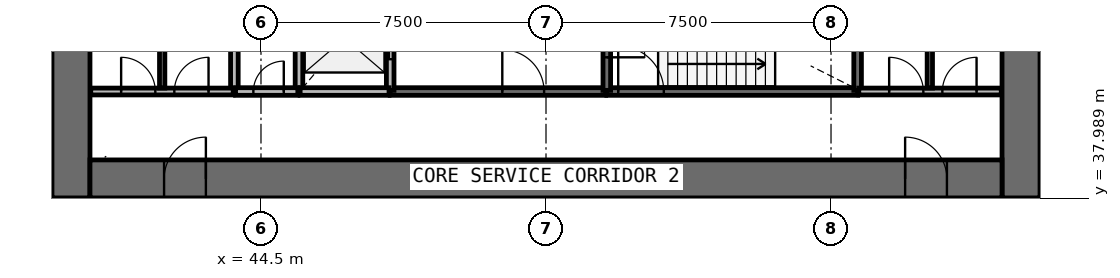
"""IFC4 building model, lengths in metres.
Left out: names, types, materials, properties, quantities, classifications, styles, units other than length and angle.
Written with IfcOpenShell. Run it as: python <this file> out.ifc"""

import sys

from ifc_helpers import new_model, si_unit, direction, frame, frame_2d, origin, place, context, subcontext, project, spatial, rectangle, extrude, source, transform, mapped, element, fill, save


model = new_model("IFC4")
c1 = context("Model", 3, precision=1e-05, world=origin(), true_north=direction((0.0, 1.0)))
c2 = subcontext(c1, "Body", "Model", "MODEL_VIEW")
j1 = project(units=[si_unit("LENGTHUNIT", "METRE"), si_unit("PLANEANGLEUNIT", "RADIAN")], contexts=[c1])
p1 = place(None, origin())
s1 = spatial("IfcSite", under=j1, at=p1, CompositionType="ELEMENT")
p2 = place(p1, origin())
s2 = spatial("IfcBuilding", under=s1, at=p2, CompositionType="ELEMENT")
p3 = place(p2, frame((0.0, 0.0, 40.2)))
s3 = spatial("IfcBuildingStorey", under=s2, at=p3, CompositionType="ELEMENT", Elevation=40.2)
p4 = place(p3, frame((64.5, 38.0, 0.0), z_axis=(0.0, 0.0, 1.0), x_axis=(0.0, 1.0, 0.0)))
e1 = element("IfcWall", 1, at=p4, inside=s3, PredefinedType="SHEAR", context=c2, shape_type="SweptSolid", body=[
    extrude(rectangle(XDim=20.0, YDim=1.0, at=frame_2d((10.0, 0.0))), origin(), (0.0, 0.0, 1.0), 4.4),
])
p5 = place(p4, frame((9.1, 0.0, 0.0)))
e2 = element("IfcOpeningElement", 2, at=p5, cuts=e1, PredefinedType="OPENING", context=c2, shape_type="SweptSolid", body=[
    extrude(rectangle(XDim=1.8, YDim=2.1, at=frame_2d((0.9, 1.05))), frame((0.0, 0.51, 0.0), z_axis=(0.0, -1.0, 0.0), x_axis=(1.0, 0.0, 0.0)), (0.0, 0.0, 1.0), 1.02),
])
p6 = place(p3, frame((39.5, 58.0, 0.0), z_axis=(0.0, 0.0, 1.0), x_axis=(0.0, -1.0, 0.0)))
e3 = element("IfcWall", 3, at=p6, inside=s3, PredefinedType="SHEAR", context=c2, shape_type="SweptSolid", body=[
    extrude(rectangle(XDim=20.0, YDim=1.0, at=frame_2d((10.0, 0.0))), origin(), (0.0, 0.0, 1.0), 4.4),
])
p7 = place(p6, frame((9.1, 0.0, 0.0)))
e4 = element("IfcOpeningElement", 4, at=p7, cuts=e3, PredefinedType="OPENING", context=c2, shape_type="SweptSolid", body=[
    extrude(rectangle(XDim=1.8, YDim=2.1, at=frame_2d((0.9, 1.05))), frame((0.0, 0.51, 0.0), z_axis=(0.0, -1.0, 0.0), x_axis=(1.0, 0.0, 0.0)), (0.0, 0.0, 1.0), 1.02),
])
p8 = place(p3, frame((40.0, 38.5, 0.0), z_axis=(0.0, 0.0, 1.0), x_axis=(1.0, 0.0, 0.0)))
e5 = element("IfcWall", 5, at=p8, inside=s3, PredefinedType="SHEAR", context=c2, shape_type="SweptSolid", body=[
    extrude(rectangle(XDim=24.0, YDim=1.0, at=frame_2d((12.0, 0.0))), origin(), (0.0, 0.0, 1.0), 4.4),
])
p9 = place(p8, frame((21.45, 0.0, 0.0)))
e6 = element("IfcOpeningElement", 6, at=p9, cuts=e5, PredefinedType="OPENING", context=c2, shape_type="SweptSolid", body=[
    extrude(rectangle(XDim=1.1, YDim=2.1, at=frame_2d((0.55, 1.05))), frame((0.0, 0.51, 0.0), z_axis=(0.0, -1.0, 0.0), x_axis=(1.0, 0.0, 0.0)), (0.0, 0.0, 1.0), 1.02),
])
p10 = place(p8, frame((1.95, 0.0, 0.0)))
e7 = element("IfcOpeningElement", 7, at=p10, cuts=e5, PredefinedType="OPENING", context=c2, shape_type="SweptSolid", body=[
    extrude(rectangle(XDim=1.1, YDim=2.1, at=frame_2d((0.55, 1.05))), frame((0.0, 0.51, 0.0), z_axis=(0.0, -1.0, 0.0), x_axis=(1.0, 0.0, 0.0)), (0.0, 0.0, 1.0), 1.02),
])
p11 = place(p3, frame((53.6, 40.8, 0.0), z_axis=(0.0, 0.0, 1.0), x_axis=(1.0, 0.0, 0.0)))
e8 = element("IfcWall", 8, at=p11, inside=s3, PredefinedType="SOLIDWALL", context=c2, shape_type="SweptSolid", body=[
    extrude(rectangle(XDim=6.6, YDim=0.2, at=frame_2d((3.3, 0.0))), origin(), (0.0, 0.0, 1.0), 3.95),
])
p12 = place(p11, frame((0.3, 0.0, 0.0)))
e9 = element("IfcOpeningElement", 9, at=p12, cuts=e8, PredefinedType="OPENING", context=c2, shape_type="SweptSolid", body=[
    extrude(rectangle(XDim=1.2, YDim=2.1, at=frame_2d((0.6, 1.05))), frame((0.0, 0.11, 0.0), z_axis=(0.0, -1.0, 0.0), x_axis=(1.0, 0.0, 0.0)), (0.0, 0.0, 1.0), 0.22),
])
p13 = place(p3, frame((47.9, 40.8, 0.0), z_axis=(0.0, 0.0, 1.0), x_axis=(1.0, 0.0, 0.0)))
e10 = element("IfcWall", 10, at=p13, inside=s3, PredefinedType="SOLIDWALL", context=c2, shape_type="SweptSolid", body=[
    extrude(rectangle(XDim=5.67, YDim=0.2, at=frame_2d((2.835, 0.0))), origin(), (0.0, 0.0, 1.0), 3.95),
])
p14 = place(p13, frame((2.95, 0.0, 0.0)))
e11 = element("IfcOpeningElement", 11, at=p14, cuts=e10, PredefinedType="OPENING", context=c2, shape_type="SweptSolid", body=[
    extrude(rectangle(XDim=1.1, YDim=2.1, at=frame_2d((0.55, 1.05))), frame((0.0, 0.11, 0.0), z_axis=(0.0, -1.0, 0.0), x_axis=(1.0, 0.0, 0.0)), (0.0, 0.0, 1.0), 0.22),
])
for number, where, z_axis, x_axis in (
    (12, (43.8, 43.6, 0.0), (0.0, 0.0, 1.0), (0.0, -1.0, 0.0)),
    (13, (45.5, 43.6, 0.0), (0.0, 0.0, 1.0), (0.0, -1.0, 0.0)),
):
    element("IfcWall", number, at=place(p3, frame(where, z_axis=z_axis, x_axis=x_axis)), inside=s3, PredefinedType="SOLIDWALL", context=c2, shape_type="SweptSolid", body=[
        extrude(rectangle(XDim=2.8, YDim=0.2, at=frame_2d((1.4, 0.0))), origin(), (0.0, 0.0, 1.0), 3.95),
    ])
p15 = place(p3, frame((47.9, 40.83, 0.0), z_axis=(0.0, 0.0, 1.0), x_axis=(0.0, 1.0, 0.0)))
e14 = element("IfcWall", 14, at=p15, inside=s3, PredefinedType="SOLIDWALL", context=c2, shape_type="SweptSolid", body=[
    extrude(rectangle(XDim=2.77, YDim=0.2, at=frame_2d((1.385, 0.0))), origin(), (0.0, 0.0, 1.0), 3.95),
])
p16 = place(p15, frame((0.82, 0.0, 0.0)))
e15 = element("IfcOpeningElement", 15, at=p16, cuts=e14, PredefinedType="OPENING", context=c2, shape_type="SweptSolid", body=[
    extrude(rectangle(XDim=1.1, YDim=2.1, at=frame_2d((0.55, 1.05))), frame((0.0, 0.11, 0.0), z_axis=(0.0, -1.0, 0.0), x_axis=(1.0, 0.0, 0.0)), (0.0, 0.0, 1.0), 0.22),
])
p17 = place(p3, frame((60.2, 40.83, 0.0), z_axis=(0.0, 0.0, 1.0), x_axis=(0.0, 1.0, 0.0)))
e16 = element("IfcWall", 16, at=p17, inside=s3, PredefinedType="SOLIDWALL", context=c2, shape_type="SweptSolid", body=[
    extrude(rectangle(XDim=2.77, YDim=0.2, at=frame_2d((1.385, 0.0))), origin(), (0.0, 0.0, 1.0), 3.95),
])
p18 = place(p3, frame((53.6, 43.6, 0.0), z_axis=(0.0, 0.0, 1.0), x_axis=(0.0, -1.0, 0.0)))
e17 = element("IfcWall", 17, at=p18, inside=s3, PredefinedType="SOLIDWALL", context=c2, shape_type="SweptSolid", body=[
    extrude(rectangle(XDim=2.77, YDim=0.2, at=frame_2d((1.385, 0.0))), origin(), (0.0, 0.0, 1.0), 3.95),
])
p19 = place(p18, frame((0.9, 0.0, 0.0)))
e18 = element("IfcOpeningElement", 18, at=p19, cuts=e17, PredefinedType="OPENING", context=c2, shape_type="SweptSolid", body=[
    extrude(rectangle(XDim=1.0, YDim=2.1, at=frame_2d((0.5, 1.05))), frame((0.0, 0.11, 0.0), z_axis=(0.0, -1.0, 0.0), x_axis=(1.0, 0.0, 0.0)), (0.0, 0.0, 1.0), 0.22),
])
p20 = place(p3, frame((45.53, 40.8, 0.0), z_axis=(0.0, 0.0, 1.0), x_axis=(1.0, 0.0, 0.0)))
e19 = element("IfcWall", 19, at=p20, inside=s3, PredefinedType="SOLIDWALL", context=c2, shape_type="SweptSolid", body=[
    extrude(rectangle(XDim=2.34, YDim=0.2, at=frame_2d((1.17, 0.0))), origin(), (0.0, 0.0, 1.0), 3.95),
])
p21 = place(p3, frame((43.83, 40.8, 0.0), z_axis=(0.0, 0.0, 1.0), x_axis=(1.0, 0.0, 0.0)))
e20 = element("IfcWall", 20, at=p21, inside=s3, PredefinedType="SOLIDWALL", context=c2, shape_type="SweptSolid", body=[
    extrude(rectangle(XDim=1.64, YDim=0.2, at=frame_2d((0.82, 0.0))), origin(), (0.0, 0.0, 1.0), 3.95),
])
p22 = place(p21, frame((0.47, 0.0, 0.0)))
e21 = element("IfcOpeningElement", 21, at=p22, cuts=e20, PredefinedType="OPENING", context=c2, shape_type="SweptSolid", body=[
    extrude(rectangle(XDim=0.8, YDim=2.1, at=frame_2d((0.4, 1.05))), frame((0.0, 0.11, 0.0), z_axis=(0.0, -1.0, 0.0), x_axis=(1.0, 0.0, 0.0)), (0.0, 0.0, 1.0), 0.22),
])
p23 = place(p3, frame((40.02, 40.8, 0.0), z_axis=(0.0, 0.0, 1.0), x_axis=(1.0, 0.0, 0.0)))
e22 = element("IfcWall", 22, at=p23, inside=s3, PredefinedType="PARTITIONING", context=c2, shape_type="SweptSolid", body=[
    extrude(rectangle(XDim=3.75, YDim=0.18, at=frame_2d((1.875, 0.0))), origin(), (0.0, 0.0, 1.0), 3.95),
])
p24 = place(p23, frame((0.8, 0.0, 0.0)))
e23 = element("IfcOpeningElement", 23, at=p24, cuts=e22, PredefinedType="OPENING", context=c2, shape_type="SweptSolid", body=[
    extrude(rectangle(XDim=0.9, YDim=2.1, at=frame_2d((0.45, 1.05))), frame((0.0, 0.1, 0.0), z_axis=(0.0, -1.0, 0.0), x_axis=(1.0, 0.0, 0.0)), (0.0, 0.0, 1.0), 0.2),
])
p25 = place(p23, frame((2.2, 0.0, 0.0)))
e24 = element("IfcOpeningElement", 24, at=p25, cuts=e22, PredefinedType="OPENING", context=c2, shape_type="SweptSolid", body=[
    extrude(rectangle(XDim=0.9, YDim=2.1, at=frame_2d((0.45, 1.05))), frame((0.0, 0.1, 0.0), z_axis=(0.0, -1.0, 0.0), x_axis=(1.0, 0.0, 0.0)), (0.0, 0.0, 1.0), 0.2),
])
p26 = place(p3, frame((60.23, 40.8, 0.0), z_axis=(0.0, 0.0, 1.0), x_axis=(1.0, 0.0, 0.0)))
e25 = element("IfcWall", 25, at=p26, inside=s3, PredefinedType="PARTITIONING", context=c2, shape_type="SweptSolid", body=[
    extrude(rectangle(XDim=3.75, YDim=0.18, at=frame_2d((1.875, 0.0))), origin(), (0.0, 0.0, 1.0), 3.95),
])
p27 = place(p26, frame((0.8, 0.0, 0.0)))
e26 = element("IfcOpeningElement", 26, at=p27, cuts=e25, PredefinedType="OPENING", context=c2, shape_type="SweptSolid", body=[
    extrude(rectangle(XDim=0.9, YDim=2.1, at=frame_2d((0.45, 1.05))), frame((0.0, 0.1, 0.0), z_axis=(0.0, -1.0, 0.0), x_axis=(1.0, 0.0, 0.0)), (0.0, 0.0, 1.0), 0.2),
])
p28 = place(p26, frame((2.2, 0.0, 0.0)))
e27 = element("IfcOpeningElement", 27, at=p28, cuts=e25, PredefinedType="OPENING", context=c2, shape_type="SweptSolid", body=[
    extrude(rectangle(XDim=0.9, YDim=2.1, at=frame_2d((0.45, 1.05))), frame((0.0, 0.1, 0.0), z_axis=(0.0, -1.0, 0.0), x_axis=(1.0, 0.0, 0.0)), (0.0, 0.0, 1.0), 0.2),
])
for number, where, z_axis, x_axis in (
    (28, (41.9, 40.89, 0.0), (0.0, 0.0, 1.0), (0.0, 1.0, 0.0)),
    (29, (62.1, 40.89, 0.0), (0.0, 0.0, 1.0), (0.0, 1.0, 0.0)),
):
    element("IfcWall", number, at=place(p3, frame(where, z_axis=z_axis, x_axis=x_axis)), inside=s3, PredefinedType="PARTITIONING", context=c2, shape_type="SweptSolid", body=[
        extrude(rectangle(XDim=2.71, YDim=0.14, at=frame_2d((1.355, 0.0))), origin(), (0.0, 0.0, 1.0), 3.05),
    ])
m1 = source(origin(), c2, "Body", "SweptSolid", [
    extrude(rectangle(XDim=1.1, YDim=2.1, at=frame_2d((0.55, 1.05))), frame((0.0, 0.025, 0.0), z_axis=(0.0, -1.0, 0.0), x_axis=(1.0, 0.0, 0.0)), (0.0, 0.0, 1.0), 0.05),
])
p29 = place(p16, origin())
e30 = element("IfcDoor", 30, at=p29, inside=s3, OperationType="DOUBLE_DOOR_SLIDING", PredefinedType="USERDEFINED", context=c2, shape_type="MappedRepresentation", body=[
    mapped(m1, transform((0.0, 0.0, 0.0), scale=1.0)),
])
fill(e15, e30)
m2 = source(origin(), c2, "Body", "SweptSolid", [
    extrude(rectangle(XDim=1.2, YDim=2.1, at=frame_2d((0.6, 1.05))), frame((0.0, 0.025, 0.0), z_axis=(0.0, -1.0, 0.0), x_axis=(1.0, 0.0, 0.0)), (0.0, 0.0, 1.0), 0.05),
])
p30 = place(p12, origin())
e31 = element("IfcDoor", 31, at=p30, inside=s3, OperationType="SINGLE_SWING_LEFT", PredefinedType="DOOR", context=c2, shape_type="MappedRepresentation", body=[
    mapped(m2, transform((0.0, 0.0, 0.0), scale=1.0)),
])
fill(e9, e31)
m3 = source(origin(), c2, "Body", "SweptSolid", [
    extrude(rectangle(XDim=1.0, YDim=2.1, at=frame_2d((0.5, 1.05))), frame((0.0, 0.025, 0.0), z_axis=(0.0, -1.0, 0.0), x_axis=(1.0, 0.0, 0.0)), (0.0, 0.0, 1.0), 0.05),
])
p31 = place(p19, origin())
e32 = element("IfcDoor", 32, at=p31, inside=s3, OperationType="SINGLE_SWING_RIGHT", PredefinedType="DOOR", context=c2, shape_type="MappedRepresentation", body=[
    mapped(m3, transform((0.0, 0.0, 0.0), scale=1.0)),
])
fill(e18, e32)
m4 = source(origin(), c2, "Body", "SweptSolid", [
    extrude(rectangle(XDim=1.1, YDim=2.1, at=frame_2d((0.55, 1.05))), frame((0.0, 0.025, 0.0), z_axis=(0.0, -1.0, 0.0), x_axis=(1.0, 0.0, 0.0)), (0.0, 0.0, 1.0), 0.05),
])
p32 = place(p14, origin())
e33 = element("IfcDoor", 33, at=p32, inside=s3, OperationType="SINGLE_SWING_LEFT", PredefinedType="DOOR", context=c2, shape_type="MappedRepresentation", body=[
    mapped(m4, transform((0.0, 0.0, 0.0), scale=1.0)),
])
fill(e11, e33)
m5 = source(origin(), c2, "Body", "SweptSolid", [
    extrude(rectangle(XDim=0.8, YDim=2.1, at=frame_2d((0.4, 1.05))), frame((0.0, 0.025, 0.0), z_axis=(0.0, -1.0, 0.0), x_axis=(1.0, 0.0, 0.0)), (0.0, 0.0, 1.0), 0.05),
])
p33 = place(p22, origin())
e34 = element("IfcDoor", 34, at=p33, inside=s3, OperationType="SINGLE_SWING_RIGHT", PredefinedType="DOOR", context=c2, shape_type="MappedRepresentation", body=[
    mapped(m5, transform((0.0, 0.0, 0.0), scale=1.0)),
])
fill(e21, e34)
m6 = source(origin(), c2, "Body", "SweptSolid", [
    extrude(rectangle(XDim=1.1, YDim=2.1, at=frame_2d((0.55, 1.05))), frame((0.0, 0.025, 0.0), z_axis=(0.0, -1.0, 0.0), x_axis=(1.0, 0.0, 0.0)), (0.0, 0.0, 1.0), 0.05),
])
p34 = place(p9, origin())
e35 = element("IfcDoor", 35, at=p34, inside=s3, OperationType="SINGLE_SWING_LEFT", PredefinedType="DOOR", context=c2, shape_type="MappedRepresentation", body=[
    mapped(m6, transform((0.0, 0.0, 0.0), scale=1.0)),
])
fill(e6, e35)
p35 = place(p10, origin())
e36 = element("IfcDoor", 36, at=p35, inside=s3, OperationType="SINGLE_SWING_RIGHT", PredefinedType="DOOR", context=c2, shape_type="MappedRepresentation", body=[
    mapped(m6, transform((0.0, 0.0, 0.0), scale=1.0)),
])
fill(e7, e36)
m7 = source(origin(), c2, "Body", "SweptSolid", [
    extrude(rectangle(XDim=0.9, YDim=2.1, at=frame_2d((0.45, 1.05))), frame((0.0, 0.025, 0.0), z_axis=(0.0, -1.0, 0.0), x_axis=(1.0, 0.0, 0.0)), (0.0, 0.0, 1.0), 0.05),
])
p36 = place(p24, origin())
e37 = element("IfcDoor", 37, at=p36, inside=s3, OperationType="SINGLE_SWING_LEFT", PredefinedType="DOOR", context=c2, shape_type="MappedRepresentation", body=[
    mapped(m7, transform((0.0, 0.0, 0.0), scale=1.0)),
])
fill(e23, e37)
p37 = place(p25, origin())
e38 = element("IfcDoor", 38, at=p37, inside=s3, OperationType="SINGLE_SWING_RIGHT", PredefinedType="DOOR", context=c2, shape_type="MappedRepresentation", body=[
    mapped(m7, transform((0.0, 0.0, 0.0), scale=1.0)),
])
fill(e24, e38)
p38 = place(p27, origin())
e39 = element("IfcDoor", 39, at=p38, inside=s3, OperationType="SINGLE_SWING_LEFT", PredefinedType="DOOR", context=c2, shape_type="MappedRepresentation", body=[
    mapped(m7, transform((0.0, 0.0, 0.0), scale=1.0)),
])
fill(e26, e39)
p39 = place(p28, origin())
e40 = element("IfcDoor", 40, at=p39, inside=s3, OperationType="SINGLE_SWING_RIGHT", PredefinedType="DOOR", context=c2, shape_type="MappedRepresentation", body=[
    mapped(m7, transform((0.0, 0.0, 0.0), scale=1.0)),
])
fill(e27, e40)
save(model, sys.argv[1])
